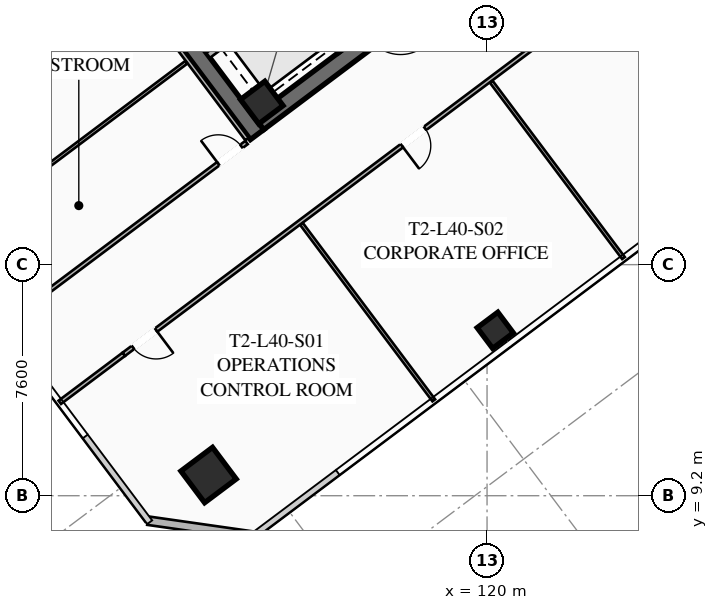
"""IFC4 building model, lengths in metres.
Left out: names, types, materials, properties, quantities, classifications, styles, units other than length and angle.
Written with IfcOpenShell. Run it as: python <this file> out.ifc"""

import sys

from ifc_helpers import new_model, si_unit, direction, frame, frame_2d, origin, origin_2d, place, context, subcontext, project, spatial, rectangle, hollow_rectangle, extrude, element, fill, save


model = new_model("IFC4")
c1 = context("Model", 3, precision=1e-05, world=origin(), true_north=direction((0.0, 1.0)))
c2 = subcontext(c1, "Body", "Model", "MODEL_VIEW")
j1 = project(units=[si_unit("LENGTHUNIT", "METRE"), si_unit("PLANEANGLEUNIT", "RADIAN")], contexts=[c1])
p1 = place(None, origin())
s1 = spatial("IfcSite", under=j1, at=p1, CompositionType="ELEMENT")
p2 = place(p1, origin())
s2 = spatial("IfcBuilding", under=s1, at=p2, CompositionType="ELEMENT")
p3 = place(p2, frame((0.0, 0.0, 149.9)))
s3 = spatial("IfcBuildingStorey", under=s2, at=p3, CompositionType="ELEMENT", Elevation=149.9)
p4 = place(p3, frame((112.436, 21.077, 0.0), z_axis=(0.0, 0.0, 1.0), x_axis=(-0.600005007985, 0.799996243986, 0.0)))
e1 = element("IfcWall", 1, at=p4, inside=s3, PredefinedType="SHEAR", context=c2, shape_type="SweptSolid", body=[
    extrude(rectangle(XDim=15.6, YDim=0.55, at=frame_2d((7.8, 0.0))), origin(), (0.0, 0.0, 1.0), 3.55),
])
p5 = place(p3, frame((124.539, 30.498, 0.0), z_axis=(0.0, 0.0, 1.0), x_axis=(-0.799998054672, -0.600002593761, 0.0)))
e2 = element("IfcWall", 2, at=p5, inside=s3, PredefinedType="SHEAR", context=c2, shape_type="SweptSolid", body=[
    extrude(rectangle(XDim=15.06, YDim=0.55, at=frame_2d((7.53, 0.0))), origin(), (0.0, 0.0, 1.0), 3.55),
])
p6 = place(p5, frame((9.23, 0.0, 0.0)))
e3 = element("IfcOpeningElement", 3, at=p6, cuts=e2, PredefinedType="OPENING", context=c2, shape_type="SweptSolid", body=[
    extrude(rectangle(XDim=1.25, YDim=2.25, at=frame_2d((0.625, 1.125))), frame((0.0, 0.285, 0.0), z_axis=(0.0, -1.0, 0.0), x_axis=(1.0, 0.0, 0.0)), (0.0, 0.0, 1.0), 0.57),
])
p7 = place(p5, frame((4.18, 0.0, 0.0)))
e4 = element("IfcOpeningElement", 4, at=p7, cuts=e2, PredefinedType="OPENING", context=c2, shape_type="SweptSolid", body=[
    extrude(rectangle(XDim=1.25, YDim=2.25, at=frame_2d((0.625, 1.125))), frame((0.0, 0.285, 0.0), z_axis=(0.0, -1.0, 0.0), x_axis=(1.0, 0.0, 0.0)), (0.0, 0.0, 1.0), 0.57),
])
p8 = place(p3, frame((112.59, 22.13, 0.0), z_axis=(0.0, 0.0, 1.0), x_axis=(0.799999996291, 0.600000004945, 0.0)))
e5 = element("IfcColumn", 5, at=p8, inside=s3, PredefinedType="COLUMN", context=c2, shape_type="SweptSolid", body=[
    extrude(hollow_rectangle(XDim=1.0, YDim=1.0, WallThickness=0.04, at=origin_2d()), origin(), (0.0, 0.0, 1.0), 3.37),
])
p9 = place(p3, frame((110.84, 9.88, 0.0), z_axis=(0.0, 0.0, 1.0), x_axis=(0.799999996291, 0.600000004945, 0.0)))
e6 = element("IfcColumn", 6, at=p9, inside=s3, PredefinedType="COLUMN", context=c2, shape_type="SweptSolid", body=[
    extrude(hollow_rectangle(XDim=1.3, YDim=1.3, WallThickness=0.05, at=origin_2d()), origin(), (0.0, 0.0, 1.0), 3.37),
])
p10 = place(p3, frame((120.27, 14.64, 0.0), z_axis=(0.0, 0.0, 1.0), x_axis=(0.799999996291, 0.600000004945, 0.0)))
e7 = element("IfcColumn", 7, at=p10, inside=s3, PredefinedType="COLUMN", context=c2, shape_type="SweptSolid", body=[
    extrude(hollow_rectangle(XDim=0.85, YDim=0.85, WallThickness=0.035, at=origin_2d()), origin(), (0.0, 0.0, 1.0), 3.37),
])
p11 = place(p3, frame((112.34, 7.88, 0.0), z_axis=(0.0, 0.0, 1.0), x_axis=(-0.989949493661, 0.141421356237, 0.0)))
e8 = element("IfcWall", 8, at=p11, inside=s3, PredefinedType="SOLIDWALL", context=c2, shape_type="SweptSolid", body=[
    extrude(rectangle(XDim=3.536, YDim=0.28, at=frame_2d((1.768, 0.0))), origin(), (0.0, 0.0, 1.0), 3.37),
])
p12 = place(p3, frame((110.826, 23.682, 0.0), z_axis=(0.0, 0.0, 1.0), x_axis=(0.8, 0.6, 0.0)))
e9 = element("IfcWall", 9, at=p12, inside=s3, PredefinedType="SOLIDWALL", context=c2, shape_type="SweptSolid", body=[
    extrude(rectangle(XDim=3.48, YDim=0.2, at=frame_2d((1.74, 0.0))), origin(), (0.0, 0.0, 1.0), 3.37),
])
p13 = place(p3, frame((133.09, 32.63, 0.0), z_axis=(0.0, 0.0, 1.0), x_axis=(-0.800003744006, -0.59999500796, 0.0)))
e10 = element("IfcWall", 10, at=p13, inside=s3, PredefinedType="PARTITIONING", context=c2, shape_type="SweptSolid", body=[
    extrude(rectangle(XDim=31.3, YDim=0.135, at=frame_2d((15.65, 0.0))), origin(), (0.0, 0.0, 1.0), 2.723),
])
p14 = place(p13, frame((29.97, 0.0, 0.0)))
e11 = element("IfcOpeningElement", 11, at=p14, cuts=e10, PredefinedType="OPENING", context=c2, shape_type="SweptSolid", body=[
    extrude(rectangle(XDim=0.95, YDim=2.05, at=frame_2d((0.475, 1.025))), frame((0.0, 0.077, 0.0), z_axis=(0.0, -1.0, 0.0), x_axis=(1.0, 0.0, 0.0)), (0.0, 0.0, 1.0), 0.155),
])
p15 = place(p13, frame((18.914, 0.0, 0.0)))
e12 = element("IfcOpeningElement", 12, at=p15, cuts=e10, PredefinedType="OPENING", context=c2, shape_type="SweptSolid", body=[
    extrude(rectangle(XDim=0.95, YDim=2.05, at=frame_2d((0.475, 1.025))), frame((0.0, 0.077, 0.0), z_axis=(0.0, -1.0, 0.0), x_axis=(1.0, 0.0, 0.0)), (0.0, 0.0, 1.0), 0.155),
])
p16 = place(p13, frame((0.38, 0.0, 0.0)))
e13 = element("IfcOpeningElement", 13, at=p16, cuts=e10, PredefinedType="OPENING", context=c2, shape_type="SweptSolid", body=[
    extrude(rectangle(XDim=0.95, YDim=2.05, at=frame_2d((0.475, 1.025))), frame((0.0, 0.077, 0.0), z_axis=(0.0, -1.0, 0.0), x_axis=(1.0, 0.0, 0.0)), (0.0, 0.0, 1.0), 0.155),
])
p17 = place(p3, frame((105.946, 12.272, 0.0), z_axis=(0.0, 0.0, 1.0), x_axis=(0.799977721118, 0.600029704027, 0.0)))
e14 = element("IfcWall", 14, at=p17, inside=s3, PredefinedType="PARTITIONING", context=c2, shape_type="SweptSolid", body=[
    extrude(rectangle(XDim=2.63, YDim=0.135, at=frame_2d((1.315, 0.0))), origin(), (0.0, 0.0, 1.0), 2.723),
])
for number, where, z_axis, x_axis in (
    (15, (118.248, 12.336, 0.0), (0.0, 0.0, 1.0), (-0.6, 0.8, 0.0)),
    (16, (124.488, 17.016, 0.0), (0.0, 0.0, 1.0), (-0.6, 0.8, 0.0)),
):
    element("IfcWall", number, at=place(p3, frame(where, z_axis=z_axis, x_axis=x_axis)), inside=s3, PredefinedType="PARTITIONING", context=c2, shape_type="SweptSolid", body=[
        extrude(rectangle(XDim=7.25, YDim=0.11, at=frame_2d((3.625, 0.0))), origin(), (0.0, 0.0, 1.0), 2.723),
    ])
p18 = place(p3, frame((112.104, 20.928, 0.0), z_axis=(0.0, 0.0, 1.0), x_axis=(-0.599994940075, 0.800003794918, 0.0)))
e17 = element("IfcWall", 17, at=p18, inside=s3, PredefinedType="PARTITIONING", context=c2, shape_type="SweptSolid", body=[
    extrude(rectangle(XDim=15.44, YDim=0.135, at=frame_2d((7.72, 0.0))), origin(), (0.0, 0.0, 1.0), 2.723),
])
p19 = place(p3, frame((104.056, 14.792, 0.0), z_axis=(0.0, 0.0, 1.0), x_axis=(0.800002918023, 0.599996109283, 0.0)))
e18 = element("IfcWall", 18, at=p19, inside=s3, PredefinedType="PARTITIONING", context=c2, shape_type="SweptSolid", body=[
    extrude(rectangle(XDim=10.04, YDim=0.135, at=frame_2d((5.02, 0.0))), origin(), (0.0, 0.0, 1.0), 2.723),
])
p20 = place(p19, frame((8.88, 0.0, 0.0)))
e19 = element("IfcOpeningElement", 19, at=p20, cuts=e18, PredefinedType="OPENING", context=c2, shape_type="SweptSolid", body=[
    extrude(rectangle(XDim=0.95, YDim=2.05, at=frame_2d((0.475, 1.025))), frame((0.0, 0.077, 0.0), z_axis=(0.0, -1.0, 0.0), x_axis=(1.0, 0.0, 0.0)), (0.0, 0.0, 1.0), 0.155),
])
p21 = place(p3, frame((102.076, 17.432, 0.0), z_axis=(0.0, 0.0, 1.0), x_axis=(0.799991245945, 0.600011671896, 0.0)))
e20 = element("IfcWall", 20, at=p21, inside=s3, PredefinedType="PARTITIONING", context=c2, shape_type="SweptSolid", body=[
    extrude(rectangle(XDim=10.04, YDim=0.11, at=frame_2d((5.02, 0.0))), origin(), (0.0, 0.0, 1.0), 2.723),
])
p22 = place(p14, origin())
e21 = element("IfcDoor", 21, at=p22, inside=s3, OperationType="SINGLE_SWING_LEFT", PredefinedType="DOOR", context=c2, shape_type="SweptSolid", body=[
    extrude(rectangle(XDim=0.95, YDim=2.05, at=frame_2d((0.475, 1.025))), frame((0.0, 0.025, 0.0), z_axis=(0.0, -1.0, 0.0), x_axis=(1.0, 0.0, 0.0)), (0.0, 0.0, 1.0), 0.05),
])
fill(e11, e21)
p23 = place(p15, origin())
e22 = element("IfcDoor", 22, at=p23, inside=s3, OperationType="SINGLE_SWING_RIGHT", PredefinedType="DOOR", context=c2, shape_type="SweptSolid", body=[
    extrude(rectangle(XDim=0.95, YDim=2.05, at=frame_2d((0.475, 1.025))), frame((0.0, 0.025, 0.0), z_axis=(0.0, -1.0, 0.0), x_axis=(1.0, 0.0, 0.0)), (0.0, 0.0, 1.0), 0.05),
])
fill(e12, e22)
p24 = place(p20, origin())
e23 = element("IfcDoor", 23, at=p24, inside=s3, OperationType="SINGLE_SWING_LEFT", PredefinedType="DOOR", context=c2, shape_type="SweptSolid", body=[
    extrude(rectangle(XDim=0.95, YDim=2.05, at=frame_2d((0.475, 1.025))), frame((0.0, 0.025, 0.0), z_axis=(0.0, -1.0, 0.0), x_axis=(1.0, 0.0, 0.0)), (0.0, 0.0, 1.0), 0.05),
])
fill(e19, e23)
save(model, sys.argv[1])
